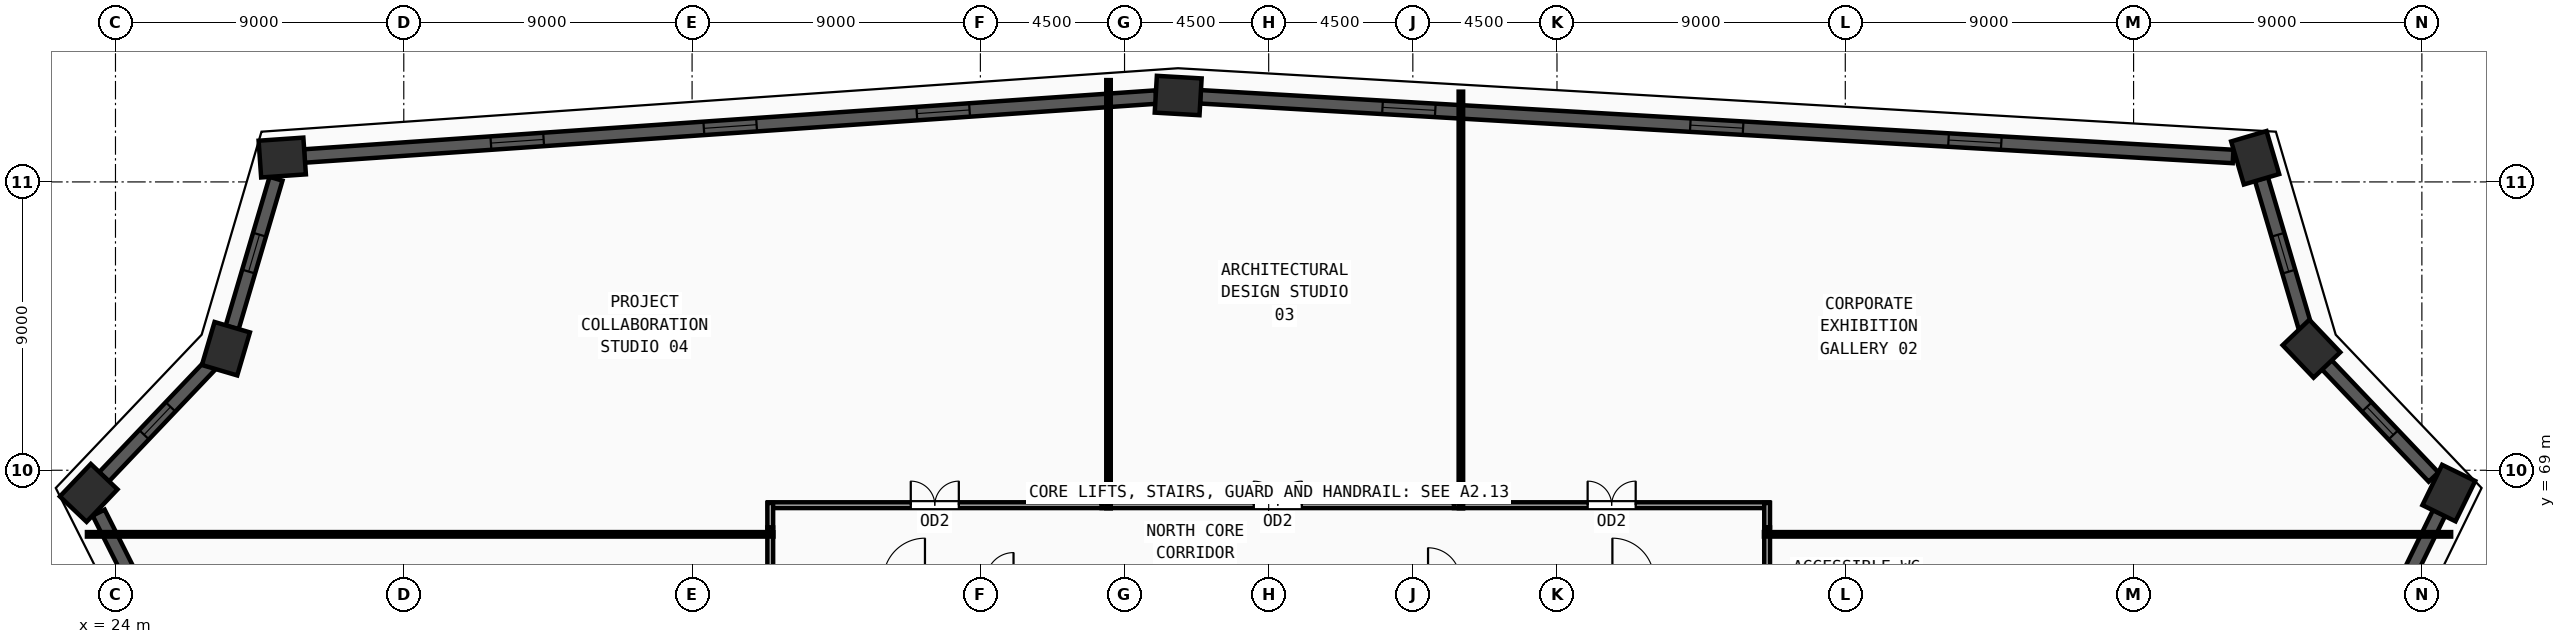
"""IFC4 building model, lengths in metres.
Left out: names, types, materials, properties, quantities, classifications, styles, units other than length and angle.
Written with IfcOpenShell. Run it as: python <this file> out.ifc"""

import sys

from ifc_helpers import new_model, si_unit, direction, frame, frame_2d, origin, origin_2d, place, context, subcontext, project, spatial, rectangle, extrude, source, transform, mapped, element, fill, save


model = new_model("IFC4")
c1 = context("Model", 3, precision=1e-05, world=origin(), true_north=direction((0.0, 1.0)))
c2 = subcontext(c1, "Body", "Model", "MODEL_VIEW")
j1 = project(units=[si_unit("LENGTHUNIT", "METRE"), si_unit("PLANEANGLEUNIT", "RADIAN")], contexts=[c1])
p1 = place(None, origin())
s1 = spatial("IfcSite", under=j1, at=p1, CompositionType="ELEMENT")
p2 = place(p1, origin())
s2 = spatial("IfcBuilding", under=s1, at=p2, CompositionType="ELEMENT")
p3 = place(p2, frame((0.0, 0.0, 102.0)))
s3 = spatial("IfcBuildingStorey", under=s2, at=p3, CompositionType="ELEMENT", Elevation=102.0)
m1 = source(origin(), c2, "Body", "SweptSolid", [
    extrude(rectangle(XDim=1.4, YDim=1.15, at=origin_2d()), origin(), (0.0, 0.0, 1.0), 3.75),
])
for number, where, z_axis, x_axis in (
    (1, (23.164, 68.293, 0.0), (0.0, 0.0, 1.0), (0.689, 0.724, 0.0)),
    (2, (27.447, 72.794, 0.0), (0.0, 0.0, 1.0), (0.283, 0.959, 0.0)),
    (3, (29.206, 78.761, 0.0), (0.0, 0.0, 1.0), (0.998, 0.069, 0.0)),
    (4, (57.175, 80.697, 0.0), (0.0, 0.0, 1.0), (-0.998, 0.058, 0.0)),
    (5, (90.796, 78.754, 0.0), (0.0, 0.0, 1.0), (-0.283, 0.959, 0.0)),
    (6, (92.553, 72.794, 0.0), (0.0, 0.0, 1.0), (-0.689, 0.724, 0.0)),
    (7, (96.841, 68.288, 0.0), (0.0, 0.0, 1.0), (0.439, 0.898, 0.0)),
):
    element("IfcColumn", number, at=place(p3, frame(where, z_axis=z_axis, x_axis=x_axis)), inside=s3, PredefinedType="COLUMN", context=c2, shape_type="MappedRepresentation", body=[
        mapped(m1, transform((0.0, 0.0, 0.0), x_axis=(1.0, 0.0, 0.0), y_axis=(0.0, 1.0, 0.0), z_axis=(0.0, 0.0, 1.0), scale=1.0)),
    ])
p4 = place(p3, frame((84.836, 43.718, 0.0), z_axis=(0.0, 0.0, 1.0), x_axis=(0.439006754844, 0.898483761234, 0.0)))
e8 = element("IfcWall", 8, at=p4, inside=s3, PredefinedType="SOLIDWALL", context=c2, shape_type="SweptSolid", body=[
    extrude(rectangle(XDim=26.656, YDim=0.42, at=frame_2d((13.328, 0.0))), origin(), (0.0, 0.0, 1.0), 3.57),
])
m2 = source(origin(), c2, "Body", "SweptSolid", [
    extrude(rectangle(XDim=1.65, YDim=1.95, at=frame_2d((0.825, 0.975))), frame((0.0, 0.22, 0.0), z_axis=(0.0, -1.0, 0.0), x_axis=(1.0, 0.0, 0.0)), (0.0, 0.0, 1.0), 0.44),
])
p5 = place(p4, frame((7.389, 0.0, 0.55)))
e9 = element("IfcOpeningElement", 9, at=p5, cuts=e8, PredefinedType="OPENING", context=c2, shape_type="MappedRepresentation", body=[
    mapped(m2, transform((0.0, 0.0, 0.0), x_axis=(1.0, 0.0, 0.0), y_axis=(0.0, 1.0, 0.0), z_axis=(0.0, 0.0, 1.0), scale=1.0)),
])
p6 = place(p4, frame((19.167, 0.0, 0.55)))
e10 = element("IfcOpeningElement", 10, at=p6, cuts=e8, PredefinedType="OPENING", context=c2, shape_type="MappedRepresentation", body=[
    mapped(m2, transform((0.0, 0.0, 0.0), x_axis=(1.0, 0.0, 0.0), y_axis=(0.0, 1.0, 0.0), z_axis=(0.0, 0.0, 1.0), scale=1.0)),
])
p7 = place(p3, frame((96.365, 68.788, 0.0), z_axis=(0.0, 0.0, 1.0), x_axis=(-0.68933261552, 0.724444991135, 0.0)))
e11 = element("IfcWall", 11, at=p7, inside=s3, PredefinedType="SOLIDWALL", context=c2, shape_type="SweptSolid", body=[
    extrude(rectangle(XDim=4.839, YDim=0.42, at=frame_2d((2.42, 0.0))), origin(), (0.0, 0.0, 1.0), 3.57),
])
m3 = source(origin(), c2, "Body", "SweptSolid", [
    extrude(rectangle(XDim=1.2, YDim=1.9, at=frame_2d((0.6, 0.95))), frame((0.0, 0.22, 0.0), z_axis=(0.0, -1.0, 0.0), x_axis=(1.0, 0.0, 0.0)), (0.0, 0.0, 1.0), 0.44),
])
p8 = place(p7, frame((1.82, 0.0, 0.55)))
e12 = element("IfcOpeningElement", 12, at=p8, cuts=e11, PredefinedType="OPENING", context=c2, shape_type="MappedRepresentation", body=[
    mapped(m3, transform((0.0, 0.0, 0.0), x_axis=(1.0, 0.0, 0.0), y_axis=(0.0, 1.0, 0.0), z_axis=(0.0, 0.0, 1.0), scale=1.0)),
])
p9 = place(p3, frame((92.358, 73.456, 0.0), z_axis=(0.0, 0.0, 1.0), x_axis=(-0.282817124876, 0.959173849663, 0.0)))
e13 = element("IfcWall", 13, at=p9, inside=s3, PredefinedType="SOLIDWALL", context=c2, shape_type="SweptSolid", body=[
    extrude(rectangle(XDim=4.833, YDim=0.42, at=frame_2d((2.417, 0.0))), origin(), (0.0, 0.0, 1.0), 3.57),
])
p10 = place(p9, frame((1.817, 0.0, 0.55)))
e14 = element("IfcOpeningElement", 14, at=p10, cuts=e13, PredefinedType="OPENING", context=c2, shape_type="MappedRepresentation", body=[
    mapped(m3, transform((0.0, 0.0, 0.0), x_axis=(1.0, 0.0, 0.0), y_axis=(0.0, 1.0, 0.0), z_axis=(0.0, 0.0, 1.0), scale=1.0)),
])
p11 = place(p3, frame((90.107, 78.794, 0.0), z_axis=(0.0, 0.0, 1.0), x_axis=(-0.998334830413, 0.057685062058, 0.0)))
e15 = element("IfcWall", 15, at=p11, inside=s3, PredefinedType="SOLIDWALL", context=c2, shape_type="SweptSolid", body=[
    extrude(rectangle(XDim=32.297, YDim=0.42, at=frame_2d((16.148, 0.0))), origin(), (0.0, 0.0, 1.0), 3.57),
])
p12 = place(p11, frame((7.249, 0.0, 0.55)))
e16 = element("IfcOpeningElement", 16, at=p12, cuts=e15, PredefinedType="OPENING", context=c2, shape_type="MappedRepresentation", body=[
    mapped(m2, transform((0.0, 0.0, 0.0), x_axis=(1.0, 0.0, 0.0), y_axis=(0.0, 1.0, 0.0), z_axis=(0.0, 0.0, 1.0), scale=1.0)),
])
p13 = place(p11, frame((15.323, 0.0, 0.55)))
e17 = element("IfcOpeningElement", 17, at=p13, cuts=e15, PredefinedType="OPENING", context=c2, shape_type="MappedRepresentation", body=[
    mapped(m2, transform((0.0, 0.0, 0.0), x_axis=(1.0, 0.0, 0.0), y_axis=(0.0, 1.0, 0.0), z_axis=(0.0, 0.0, 1.0), scale=1.0)),
])
p14 = place(p11, frame((24.948, 0.0, 0.55)))
e18 = element("IfcOpeningElement", 18, at=p14, cuts=e15, PredefinedType="OPENING", context=c2, shape_type="MappedRepresentation", body=[
    mapped(m2, transform((0.0, 0.0, 0.0), x_axis=(1.0, 0.0, 0.0), y_axis=(0.0, 1.0, 0.0), z_axis=(0.0, 0.0, 1.0), scale=1.0)),
])
p15 = place(p3, frame((56.487, 80.649, 0.0), z_axis=(0.0, 0.0, 1.0), x_axis=(-0.997615260402, -0.069020230456, 0.0)))
e19 = element("IfcWall", 19, at=p15, inside=s3, PredefinedType="SOLIDWALL", context=c2, shape_type="SweptSolid", body=[
    extrude(rectangle(XDim=26.656, YDim=0.42, at=frame_2d((13.328, 0.0))), origin(), (0.0, 0.0, 1.0), 3.57),
])
p16 = place(p15, frame((5.839, 0.0, 0.55)))
e20 = element("IfcOpeningElement", 20, at=p16, cuts=e19, PredefinedType="OPENING", context=c2, shape_type="MappedRepresentation", body=[
    mapped(m2, transform((0.0, 0.0, 0.0), x_axis=(1.0, 0.0, 0.0), y_axis=(0.0, 1.0, 0.0), z_axis=(0.0, 0.0, 1.0), scale=1.0)),
])
p17 = place(p15, frame((12.503, 0.0, 0.55)))
e21 = element("IfcOpeningElement", 21, at=p17, cuts=e19, PredefinedType="OPENING", context=c2, shape_type="MappedRepresentation", body=[
    mapped(m2, transform((0.0, 0.0, 0.0), x_axis=(1.0, 0.0, 0.0), y_axis=(0.0, 1.0, 0.0), z_axis=(0.0, 0.0, 1.0), scale=1.0)),
])
p18 = place(p15, frame((19.167, 0.0, 0.55)))
e22 = element("IfcOpeningElement", 22, at=p18, cuts=e19, PredefinedType="OPENING", context=c2, shape_type="MappedRepresentation", body=[
    mapped(m2, transform((0.0, 0.0, 0.0), x_axis=(1.0, 0.0, 0.0), y_axis=(0.0, 1.0, 0.0), z_axis=(0.0, 0.0, 1.0), scale=1.0)),
])
p19 = place(p3, frame((29.011, 78.099, 0.0), z_axis=(0.0, 0.0, 1.0), x_axis=(-0.28279156726, -0.959181385081, 0.0)))
e23 = element("IfcWall", 23, at=p19, inside=s3, PredefinedType="SOLIDWALL", context=c2, shape_type="SweptSolid", body=[
    extrude(rectangle(XDim=4.841, YDim=0.42, at=frame_2d((2.42, 0.0))), origin(), (0.0, 0.0, 1.0), 3.57),
])
p20 = place(p19, frame((1.82, 0.0, 0.55)))
e24 = element("IfcOpeningElement", 24, at=p20, cuts=e23, PredefinedType="OPENING", context=c2, shape_type="MappedRepresentation", body=[
    mapped(m3, transform((0.0, 0.0, 0.0), x_axis=(1.0, 0.0, 0.0), y_axis=(0.0, 1.0, 0.0), z_axis=(0.0, 0.0, 1.0), scale=1.0)),
])
p21 = place(p3, frame((26.971, 72.294, 0.0), z_axis=(0.0, 0.0, 1.0), x_axis=(-0.689306913108, -0.724469446934, 0.0)))
e25 = element("IfcWall", 25, at=p21, inside=s3, PredefinedType="SOLIDWALL", context=c2, shape_type="SweptSolid", body=[
    extrude(rectangle(XDim=4.833, YDim=0.42, at=frame_2d((2.416, 0.0))), origin(), (0.0, 0.0, 1.0), 3.57),
])
p22 = place(p21, frame((1.816, 0.0, 0.55)))
e26 = element("IfcOpeningElement", 26, at=p22, cuts=e25, PredefinedType="OPENING", context=c2, shape_type="MappedRepresentation", body=[
    mapped(m3, transform((0.0, 0.0, 0.0), x_axis=(1.0, 0.0, 0.0), y_axis=(0.0, 1.0, 0.0), z_axis=(0.0, 0.0, 1.0), scale=1.0)),
])
p23 = place(p3, frame((23.474, 67.677, 0.0), z_axis=(0.0, 0.0, 1.0), x_axis=(0.44918995427, -0.893436279196, 0.0)))
e27 = element("IfcWall", 27, at=p23, inside=s3, PredefinedType="SOLIDWALL", context=c2, shape_type="SweptSolid", body=[
    extrude(rectangle(XDim=32.298, YDim=0.42, at=frame_2d((16.149, 0.0))), origin(), (0.0, 0.0, 1.0), 3.57),
])
p24 = place(p23, frame((8.099, 0.0, 0.55)))
e28 = element("IfcOpeningElement", 28, at=p24, cuts=e27, PredefinedType="OPENING", context=c2, shape_type="MappedRepresentation", body=[
    mapped(m2, transform((0.0, 0.0, 0.0), x_axis=(1.0, 0.0, 0.0), y_axis=(0.0, 1.0, 0.0), z_axis=(0.0, 0.0, 1.0), scale=1.0)),
])
p25 = place(p23, frame((16.874, 0.0, 0.55)))
e29 = element("IfcOpeningElement", 29, at=p25, cuts=e27, PredefinedType="OPENING", context=c2, shape_type="MappedRepresentation", body=[
    mapped(m2, transform((0.0, 0.0, 0.0), x_axis=(1.0, 0.0, 0.0), y_axis=(0.0, 1.0, 0.0), z_axis=(0.0, 0.0, 1.0), scale=1.0)),
])
p26 = place(p23, frame((22.548, 0.0, 0.55)))
e30 = element("IfcOpeningElement", 30, at=p26, cuts=e27, PredefinedType="OPENING", context=c2, shape_type="MappedRepresentation", body=[
    mapped(m2, transform((0.0, 0.0, 0.0), x_axis=(1.0, 0.0, 0.0), y_axis=(0.0, 1.0, 0.0), z_axis=(0.0, 0.0, 1.0), scale=1.0)),
])
p27 = place(p3, frame((65.785, 67.91, 0.0), z_axis=(0.0, 0.0, 1.0), x_axis=(1.0, 0.0, 0.0)))
e31 = element("IfcWall", 31, at=p27, inside=s3, PredefinedType="PARTITIONING", context=c2, shape_type="SweptSolid", body=[
    extrude(rectangle(XDim=9.845, YDim=0.18, at=frame_2d((4.922, 0.0))), origin(), (0.0, 0.0, 1.0), 3.57),
])
m4 = source(origin(), c2, "Body", "SweptSolid", [
    extrude(rectangle(XDim=1.5, YDim=2.2, at=frame_2d((0.75, 1.1))), frame((0.0, 0.1, 0.0), z_axis=(0.0, -1.0, 0.0), x_axis=(1.0, 0.0, 0.0)), (0.0, 0.0, 1.0), 0.2),
])
p28 = place(p27, frame((4.172, 0.0, 0.0)))
e32 = element("IfcOpeningElement", 32, at=p28, cuts=e31, PredefinedType="OPENING", context=c2, shape_type="MappedRepresentation", body=[
    mapped(m4, transform((0.0, 0.0, 0.0), x_axis=(1.0, 0.0, 0.0), y_axis=(0.0, 1.0, 0.0), z_axis=(0.0, 0.0, 1.0), scale=1.0)),
])
p29 = place(p3, frame((54.785, 67.91, 0.0), z_axis=(0.0, 0.0, 1.0), x_axis=(1.0, 0.0, 0.0)))
e33 = element("IfcWall", 33, at=p29, inside=s3, PredefinedType="PARTITIONING", context=c2, shape_type="SweptSolid", body=[
    extrude(rectangle(XDim=11.0, YDim=0.18, at=frame_2d((5.5, 0.0))), origin(), (0.0, 0.0, 1.0), 3.57),
])
p30 = place(p29, frame((4.75, 0.0, 0.0)))
e34 = element("IfcOpeningElement", 34, at=p30, cuts=e33, PredefinedType="OPENING", context=c2, shape_type="MappedRepresentation", body=[
    mapped(m4, transform((0.0, 0.0, 0.0), x_axis=(1.0, 0.0, 0.0), y_axis=(0.0, 1.0, 0.0), z_axis=(0.0, 0.0, 1.0), scale=1.0)),
])
p31 = place(p3, frame((44.37, 67.91, 0.0), z_axis=(0.0, 0.0, 1.0), x_axis=(1.0, 0.0, 0.0)))
e35 = element("IfcWall", 35, at=p31, inside=s3, PredefinedType="PARTITIONING", context=c2, shape_type="SweptSolid", body=[
    extrude(rectangle(XDim=10.415, YDim=0.18, at=frame_2d((5.208, 0.0))), origin(), (0.0, 0.0, 1.0), 3.57),
])
p32 = place(p31, frame((4.457, 0.0, 0.0)))
e36 = element("IfcOpeningElement", 36, at=p32, cuts=e35, PredefinedType="OPENING", context=c2, shape_type="MappedRepresentation", body=[
    mapped(m4, transform((0.0, 0.0, 0.0), x_axis=(1.0, 0.0, 0.0), y_axis=(0.0, 1.0, 0.0), z_axis=(0.0, 0.0, 1.0), scale=1.0)),
])
p33 = place(p3, frame((44.44, 61.285, 0.0), z_axis=(0.0, 0.0, 1.0), x_axis=(0.0, 1.0, 0.0)))
e37 = element("IfcWall", 37, at=p33, inside=s3, PredefinedType="PARTITIONING", context=c2, shape_type="SweptSolid", body=[
    extrude(rectangle(XDim=5.93, YDim=0.18, at=frame_2d((2.965, 0.0))), origin(), (0.0, 0.0, 1.0), 3.57),
])
m5 = source(origin(), c2, "Body", "SweptSolid", [
    extrude(rectangle(XDim=1.0, YDim=2.2, at=frame_2d((0.5, 1.1))), frame((0.0, 0.1, 0.0), z_axis=(0.0, -1.0, 0.0), x_axis=(1.0, 0.0, 0.0)), (0.0, 0.0, 1.0), 0.2),
])
p34 = place(p33, frame((2.465, 0.0, 0.0)))
e38 = element("IfcOpeningElement", 38, at=p34, cuts=e37, PredefinedType="OPENING", context=c2, shape_type="MappedRepresentation", body=[
    mapped(m5, transform((0.0, 0.0, 0.0), x_axis=(1.0, 0.0, 0.0), y_axis=(0.0, 1.0, 0.0), z_axis=(0.0, 0.0, 1.0), scale=1.0)),
])
p35 = place(p3, frame((75.56, 67.215, 0.0), z_axis=(0.0, 0.0, 1.0), x_axis=(0.0, -1.0, 0.0)))
e39 = element("IfcWall", 39, at=p35, inside=s3, PredefinedType="PARTITIONING", context=c2, shape_type="SweptSolid", body=[
    extrude(rectangle(XDim=2.035, YDim=0.18, at=frame_2d((1.018, 0.0))), origin(), (0.0, 0.0, 1.0), 3.57),
])
for number, where, z_axis, x_axis in (
    (40, (75.56, 67.98, 0.0), (0.0, 0.0, 1.0), (0.0, -1.0, 0.0)),
    (41, (44.44, 67.215, 0.0), (0.0, 0.0, 1.0), (0.0, 1.0, 0.0)),
):
    element("IfcWall", number, at=place(p3, frame(where, z_axis=z_axis, x_axis=x_axis)), inside=s3, PredefinedType="PARTITIONING", context=c2, shape_type="SweptSolid", body=[
        extrude(rectangle(XDim=0.765, YDim=0.18, at=frame_2d((0.382, 0.0))), origin(), (0.0, 0.0, 1.0), 3.57),
    ])
p36 = place(p3, frame((44.54, 67.0, 0.0), z_axis=(0.0, 0.0, 1.0), x_axis=(-1.0, 0.0, 0.0)))
e42 = element("IfcWall", 42, at=p36, inside=s3, PredefinedType="PARTITIONING", context=c2, shape_type="SweptSolid", body=[
    extrude(rectangle(XDim=21.431, YDim=0.14, at=frame_2d((10.716, 0.0))), origin(), (0.0, 0.0, 1.0), 2.755),
])
p37 = place(p3, frame((75.46, 67.0, 0.0), z_axis=(0.0, 0.0, 1.0), x_axis=(1.0, 0.0, 0.0)))
e43 = element("IfcWall", 43, at=p37, inside=s3, PredefinedType="PARTITIONING", context=c2, shape_type="SweptSolid", body=[
    extrude(rectangle(XDim=21.453, YDim=0.14, at=frame_2d((10.727, 0.0))), origin(), (0.0, 0.0, 1.0), 2.755),
])
p38 = place(p3, frame((55.0, 67.81, 0.0), z_axis=(0.0, 0.0, 1.0), x_axis=(0.0, 1.0, 0.0)))
e44 = element("IfcWall", 44, at=p38, inside=s3, PredefinedType="PARTITIONING", context=c2, shape_type="SweptSolid", body=[
    extrude(rectangle(XDim=13.368, YDim=0.14, at=frame_2d((6.684, 0.0))), origin(), (0.0, 0.0, 1.0), 3.57),
])
p39 = place(p3, frame((66.0, 67.81, 0.0), z_axis=(0.0, 0.0, 1.0), x_axis=(0.0, 1.0, 0.0)))
e45 = element("IfcWall", 45, at=p39, inside=s3, PredefinedType="PARTITIONING", context=c2, shape_type="SweptSolid", body=[
    extrude(rectangle(XDim=13.008, YDim=0.14, at=frame_2d((6.504, 0.0))), origin(), (0.0, 0.0, 1.0), 3.57),
])
m6 = source(origin(), c2, "Body", "SweptSolid", [
    extrude(rectangle(XDim=1.2, YDim=1.9, at=frame_2d((0.6, 0.95))), frame((0.0, 0.03, 0.0), z_axis=(0.0, -1.0, 0.0), x_axis=(1.0, 0.0, 0.0)), (0.0, 0.0, 1.0), 0.06),
])
p40 = place(p8, origin())
e46 = element("IfcWindow", 46, at=p40, inside=s3, PartitioningType="SINGLE_PANEL", PredefinedType="WINDOW", context=c2, shape_type="MappedRepresentation", body=[
    mapped(m6, transform((0.0, 0.0, 0.0), x_axis=(1.0, 0.0, 0.0), y_axis=(0.0, 1.0, 0.0), z_axis=(0.0, 0.0, 1.0), scale=1.0)),
])
fill(e12, e46)
p41 = place(p10, origin())
e47 = element("IfcWindow", 47, at=p41, inside=s3, PartitioningType="SINGLE_PANEL", PredefinedType="WINDOW", context=c2, shape_type="MappedRepresentation", body=[
    mapped(m6, transform((0.0, 0.0, 0.0), x_axis=(1.0, 0.0, 0.0), y_axis=(0.0, 1.0, 0.0), z_axis=(0.0, 0.0, 1.0), scale=1.0)),
])
fill(e14, e47)
m7 = source(origin(), c2, "Body", "SweptSolid", [
    extrude(rectangle(XDim=1.65, YDim=1.95, at=frame_2d((0.825, 0.975))), frame((0.0, 0.03, 0.0), z_axis=(0.0, -1.0, 0.0), x_axis=(1.0, 0.0, 0.0)), (0.0, 0.0, 1.0), 0.06),
])
p42 = place(p12, origin())
e48 = element("IfcWindow", 48, at=p42, inside=s3, PartitioningType="DOUBLE_PANEL_VERTICAL", PredefinedType="WINDOW", context=c2, shape_type="MappedRepresentation", body=[
    mapped(m7, transform((0.0, 0.0, 0.0), x_axis=(1.0, 0.0, 0.0), y_axis=(0.0, 1.0, 0.0), z_axis=(0.0, 0.0, 1.0), scale=1.0)),
])
fill(e16, e48)
p43 = place(p13, origin())
e49 = element("IfcWindow", 49, at=p43, inside=s3, PartitioningType="DOUBLE_PANEL_VERTICAL", PredefinedType="WINDOW", context=c2, shape_type="MappedRepresentation", body=[
    mapped(m7, transform((0.0, 0.0, 0.0), x_axis=(1.0, 0.0, 0.0), y_axis=(0.0, 1.0, 0.0), z_axis=(0.0, 0.0, 1.0), scale=1.0)),
])
fill(e17, e49)
p44 = place(p14, origin())
e50 = element("IfcWindow", 50, at=p44, inside=s3, PartitioningType="DOUBLE_PANEL_VERTICAL", PredefinedType="WINDOW", context=c2, shape_type="MappedRepresentation", body=[
    mapped(m7, transform((0.0, 0.0, 0.0), x_axis=(1.0, 0.0, 0.0), y_axis=(0.0, 1.0, 0.0), z_axis=(0.0, 0.0, 1.0), scale=1.0)),
])
fill(e18, e50)
p45 = place(p16, origin())
e51 = element("IfcWindow", 51, at=p45, inside=s3, PartitioningType="DOUBLE_PANEL_VERTICAL", PredefinedType="WINDOW", context=c2, shape_type="MappedRepresentation", body=[
    mapped(m7, transform((0.0, 0.0, 0.0), x_axis=(1.0, 0.0, 0.0), y_axis=(0.0, 1.0, 0.0), z_axis=(0.0, 0.0, 1.0), scale=1.0)),
])
fill(e20, e51)
p46 = place(p17, origin())
e52 = element("IfcWindow", 52, at=p46, inside=s3, PartitioningType="DOUBLE_PANEL_VERTICAL", PredefinedType="WINDOW", context=c2, shape_type="MappedRepresentation", body=[
    mapped(m7, transform((0.0, 0.0, 0.0), x_axis=(1.0, 0.0, 0.0), y_axis=(0.0, 1.0, 0.0), z_axis=(0.0, 0.0, 1.0), scale=1.0)),
])
fill(e21, e52)
p47 = place(p18, origin())
e53 = element("IfcWindow", 53, at=p47, inside=s3, PartitioningType="DOUBLE_PANEL_VERTICAL", PredefinedType="WINDOW", context=c2, shape_type="MappedRepresentation", body=[
    mapped(m7, transform((0.0, 0.0, 0.0), x_axis=(1.0, 0.0, 0.0), y_axis=(0.0, 1.0, 0.0), z_axis=(0.0, 0.0, 1.0), scale=1.0)),
])
fill(e22, e53)
p48 = place(p20, origin())
e54 = element("IfcWindow", 54, at=p48, inside=s3, PartitioningType="SINGLE_PANEL", PredefinedType="WINDOW", context=c2, shape_type="MappedRepresentation", body=[
    mapped(m6, transform((0.0, 0.0, 0.0), x_axis=(1.0, 0.0, 0.0), y_axis=(0.0, 1.0, 0.0), z_axis=(0.0, 0.0, 1.0), scale=1.0)),
])
fill(e24, e54)
p49 = place(p22, origin())
e55 = element("IfcWindow", 55, at=p49, inside=s3, PartitioningType="SINGLE_PANEL", PredefinedType="WINDOW", context=c2, shape_type="MappedRepresentation", body=[
    mapped(m6, transform((0.0, 0.0, 0.0), x_axis=(1.0, 0.0, 0.0), y_axis=(0.0, 1.0, 0.0), z_axis=(0.0, 0.0, 1.0), scale=1.0)),
])
fill(e26, e55)
m8 = source(origin(), c2, "Body", "SweptSolid", [
    extrude(rectangle(XDim=1.5, YDim=2.2, at=frame_2d((0.75, 1.1))), frame((0.0, 0.025, 0.0), z_axis=(0.0, -1.0, 0.0), x_axis=(1.0, 0.0, 0.0)), (0.0, 0.0, 1.0), 0.05),
])
p50 = place(p28, origin())
e56 = element("IfcDoor", 56, at=p50, inside=s3, OperationType="DOUBLE_DOOR_SINGLE_SWING", PredefinedType="DOOR", context=c2, shape_type="MappedRepresentation", body=[
    mapped(m8, transform((0.0, 0.0, 0.0), x_axis=(1.0, 0.0, 0.0), y_axis=(0.0, 1.0, 0.0), z_axis=(0.0, 0.0, 1.0), scale=1.0)),
])
fill(e32, e56)
p51 = place(p30, origin())
e57 = element("IfcDoor", 57, at=p51, inside=s3, OperationType="DOUBLE_DOOR_SINGLE_SWING", PredefinedType="DOOR", context=c2, shape_type="MappedRepresentation", body=[
    mapped(m8, transform((0.0, 0.0, 0.0), x_axis=(1.0, 0.0, 0.0), y_axis=(0.0, 1.0, 0.0), z_axis=(0.0, 0.0, 1.0), scale=1.0)),
])
fill(e34, e57)
p52 = place(p32, origin())
e58 = element("IfcDoor", 58, at=p52, inside=s3, OperationType="DOUBLE_DOOR_SINGLE_SWING", PredefinedType="DOOR", context=c2, shape_type="MappedRepresentation", body=[
    mapped(m8, transform((0.0, 0.0, 0.0), x_axis=(1.0, 0.0, 0.0), y_axis=(0.0, 1.0, 0.0), z_axis=(0.0, 0.0, 1.0), scale=1.0)),
])
fill(e36, e58)
save(model, sys.argv[1])
